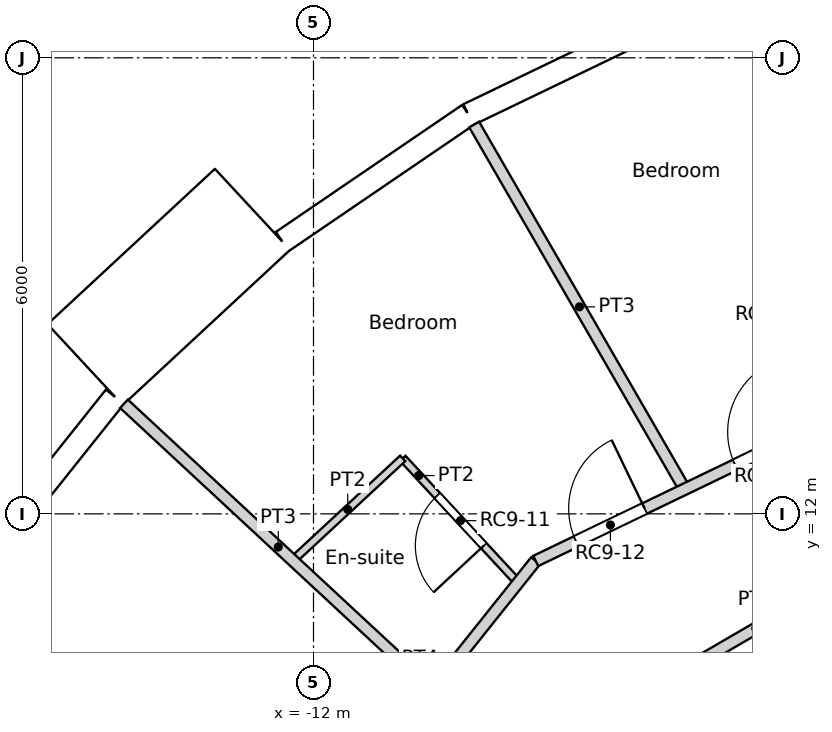
"""IFC4 building model, lengths in metres.
Left out: names, types, materials, properties, quantities, classifications, styles, units other than length and angle.
Written with IfcOpenShell. Run it as: python <this file> out.ifc"""

import sys

from ifc_helpers import new_model, si_unit, direction, frame, frame_2d, origin, origin_2d, place, context, subcontext, project, spatial, rectangle, circle, extrude, element, fill, save


model = new_model("IFC4")
c1 = context("Model", 3, precision=1e-05, world=origin(), true_north=direction((0.0, 1.0)))
c2 = subcontext(c1, "Body", "Model", "MODEL_VIEW")
j1 = project(units=[si_unit("LENGTHUNIT", "METRE"), si_unit("PLANEANGLEUNIT", "RADIAN")], contexts=[c1])
p1 = place(None, origin())
s1 = spatial("IfcSite", under=j1, at=p1, CompositionType="ELEMENT")
p2 = place(p1, origin())
s2 = spatial("IfcBuilding", under=s1, at=p2, CompositionType="ELEMENT")
p3 = place(p2, frame((0.0, 0.0, 316.2)))
s3 = spatial("IfcBuildingStorey", under=s2, at=p3, CompositionType="ELEMENT", Elevation=316.2)
for number, where, z_axis, x_axis in (
    (1, (-9.411, 16.301, 0.0), (0.0, 0.0, 1.0), (1.0, 0.0, 0.0)),
    (2, (-13.798, 12.802, 0.0), (0.0, 0.0, 1.0), (1.0, 0.0, 0.0)),
):
    element("IfcColumn", number, at=place(p3, frame(where, z_axis=z_axis, x_axis=x_axis)), inside=s3, PredefinedType="COLUMN", context=c2, shape_type="SweptSolid", body=[
        extrude(circle(Radius=0.45, at=origin_2d()), origin(), (0.0, 0.0, 1.0), 3.6),
    ])
p4 = place(p3, frame((-7.292, 18.538, 0.0), z_axis=(0.0, 0.0, 1.0), x_axis=(-0.90095513435, -0.433912255978, 0.0)))
e3 = element("IfcWall", 3, at=p4, inside=s3, PredefinedType="SOLIDWALL", context=c2, shape_type="SweptSolid", body=[
    extrude(rectangle(XDim=2.962, YDim=0.3, at=frame_2d((1.481, 0.0))), origin(), (0.0, 0.0, 1.0), 3.25),
])
p5 = place(p4, frame((1.481, 0.0, 1.55)))
e4 = element("IfcOpeningElement", 4, at=p5, cuts=e3, PredefinedType="OPENING", context=c2, shape_type="SweptSolid", body=[
    extrude(circle(Radius=0.9, at=origin_2d()), frame((0.0, 0.16, 0.0), z_axis=(0.0, -1.0, 0.0), x_axis=(1.0, 0.0, 0.0)), (0.0, 0.0, 1.0), 0.32),
])
p6 = place(p3, frame((-9.961, 17.253, 0.0), z_axis=(0.0, 0.0, 1.0), x_axis=(-0.826236061068, -0.563324037646, 0.0)))
e5 = element("IfcWall", 5, at=p6, inside=s3, PredefinedType="SOLIDWALL", context=c2, shape_type="SweptSolid", body=[
    extrude(rectangle(XDim=2.962, YDim=0.3, at=frame_2d((1.481, 0.0))), origin(), (0.0, 0.0, 1.0), 3.25),
])
p7 = place(p6, frame((1.481, 0.0, 1.55)))
e6 = element("IfcOpeningElement", 6, at=p7, cuts=e5, PredefinedType="OPENING", context=c2, shape_type="SweptSolid", body=[
    extrude(circle(Radius=0.9, at=origin_2d()), frame((0.0, 0.16, 0.0), z_axis=(0.0, -1.0, 0.0), x_axis=(1.0, 0.0, 0.0)), (0.0, 0.0, 1.0), 0.32),
])
p8 = place(p3, frame((-12.804, 16.005, -0.35), z_axis=(0.0, 0.0, 1.0), x_axis=(-0.733022439167, -0.680204457261, 0.0)))
e7 = element("IfcWall", 7, at=p8, inside=s3, PredefinedType="ELEMENTEDWALL", context=c2, shape_type="SweptSolid", body=[
    extrude(rectangle(XDim=3.0, YDim=1.45, at=frame_2d((1.5, 0.0))), origin(), (0.0, 0.0, 1.0), 3.6),
])
p9 = place(p8, frame((1.5, 0.0, 1.9)))
e8 = element("IfcOpeningElement", 8, at=p9, cuts=e7, PredefinedType="OPENING", context=c2, shape_type="SweptSolid", body=[
    extrude(circle(Radius=0.9, at=origin_2d()), frame((0.0, 0.735, 0.0), z_axis=(0.0, -1.0, 0.0), x_axis=(1.0, 0.0, 0.0)), (0.0, 0.0, 1.0), 1.47),
])
p10 = place(p3, frame((-14.613, 13.538, 0.0), z_axis=(0.0, 0.0, 1.0), x_axis=(-0.623498236992, -0.781824755599, 0.0)))
e9 = element("IfcWall", 9, at=p10, inside=s3, PredefinedType="SOLIDWALL", context=c2, shape_type="SweptSolid", body=[
    extrude(rectangle(XDim=2.962, YDim=0.3, at=frame_2d((1.481, 0.0))), origin(), (0.0, 0.0, 1.0), 3.25),
])
p11 = place(p10, frame((1.481, 0.0, 1.55)))
e10 = element("IfcOpeningElement", 10, at=p11, cuts=e9, PredefinedType="OPENING", context=c2, shape_type="SweptSolid", body=[
    extrude(circle(Radius=0.9, at=origin_2d()), frame((0.0, 0.16, 0.0), z_axis=(0.0, -1.0, 0.0), x_axis=(1.0, 0.0, 0.0)), (0.0, 0.0, 1.0), 0.32),
])
p12 = place(p3, frame((-9.092, 8.8, 0.0), z_axis=(0.0, 0.0, 1.0), x_axis=(0.864470922103, 0.502682827277, 0.0)))
e11 = element("IfcWall", 11, at=p12, inside=s3, PredefinedType="PARTITIONING", context=c2, shape_type="SweptSolid", body=[
    extrude(rectangle(XDim=6.735, YDim=0.15, at=frame_2d((3.368, 0.0))), origin(), (0.0, 0.0, 1.0), 3.25),
])
p13 = place(p3, frame((-11.137, 8.803, 0.0), z_axis=(0.0, 0.0, 1.0), x_axis=(0.624018330412, 0.781409702595, 0.0)))
e12 = element("IfcWall", 12, at=p13, inside=s3, PredefinedType="PARTITIONING", context=c2, shape_type="SweptSolid", body=[
    extrude(rectangle(XDim=3.301, YDim=0.15, at=frame_2d((1.65, 0.0))), origin(), (0.0, 0.0, 1.0), 3.25),
])
p14 = place(p3, frame((-9.076, 11.381, 0.0), z_axis=(0.0, 0.0, 1.0), x_axis=(0.900939467372, 0.433944784657, 0.0)))
e13 = element("IfcWall", 13, at=p14, inside=s3, PredefinedType="PARTITIONING", context=c2, shape_type="SweptSolid", body=[
    extrude(rectangle(XDim=6.479, YDim=0.15, at=frame_2d((3.239, 0.0))), origin(), (0.0, 0.0, 1.0), 3.25),
])
p15 = place(p14, frame((2.912, 0.0, 0.0)))
e14 = element("IfcOpeningElement", 14, at=p15, cuts=e13, PredefinedType="OPENING", context=c2, shape_type="SweptSolid", body=[
    extrude(rectangle(XDim=1.0, YDim=2.1, at=frame_2d((0.5, 1.05))), frame((0.0, 0.075, 0.0), z_axis=(0.0, -1.0, 0.0), x_axis=(1.0, 0.0, 0.0)), (0.0, 0.0, 1.0), 0.15),
])
p16 = place(p14, frame((0.59, 0.0, 0.0)))
e15 = element("IfcOpeningElement", 15, at=p16, cuts=e13, PredefinedType="OPENING", context=c2, shape_type="SweptSolid", body=[
    extrude(rectangle(XDim=1.0, YDim=2.1, at=frame_2d((0.5, 1.05))), frame((0.0, 0.075, 0.0), z_axis=(0.0, -1.0, 0.0), x_axis=(1.0, 0.0, 0.0)), (0.0, 0.0, 1.0), 0.15),
])
p17 = place(p3, frame((-9.886, 17.122, 0.0), z_axis=(0.0, 0.0, 1.0), x_axis=(0.500054359786, -0.865994016873, 0.0)))
e16 = element("IfcWall", 16, at=p17, inside=s3, PredefinedType="PARTITIONING", context=c2, shape_type="SweptSolid", body=[
    extrude(rectangle(XDim=5.54, YDim=0.15, at=frame_2d((2.77, 0.0))), origin(), (0.0, 0.0, 1.0), 3.25),
])
p18 = place(p3, frame((-10.826, 12.73, 0.0), z_axis=(0.0, 0.0, 1.0), x_axis=(0.680228963773, -0.732999697711, 0.0)))
e17 = element("IfcWall", 17, at=p18, inside=s3, PredefinedType="PARTITIONING", context=c2, shape_type="SweptSolid", body=[
    extrude(rectangle(XDim=2.235, YDim=0.1, at=frame_2d((1.117, 0.0))), origin(), (0.0, 0.0, 1.0), 3.25),
])
p19 = place(p18, frame((0.667, 0.0, 0.0)))
e18 = element("IfcOpeningElement", 18, at=p19, cuts=e17, PredefinedType="OPENING", context=c2, shape_type="SweptSolid", body=[
    extrude(rectangle(XDim=0.9, YDim=2.04, at=frame_2d((0.45, 1.02))), frame((0.0, 0.05, 0.0), z_axis=(0.0, -1.0, 0.0), x_axis=(1.0, 0.0, 0.0)), (0.0, 0.0, 1.0), 0.1),
])
p20 = place(p3, frame((-12.273, 11.387, 0.0), z_axis=(0.0, 0.0, 1.0), x_axis=(0.732956436026, 0.680275578636, 0.0)))
e19 = element("IfcWall", 19, at=p20, inside=s3, PredefinedType="PARTITIONING", context=c2, shape_type="SweptSolid", body=[
    extrude(rectangle(XDim=1.974, YDim=0.1, at=frame_2d((0.987, 0.0))), origin(), (0.0, 0.0, 1.0), 3.25),
])
p21 = place(p3, frame((-14.493, 13.448, 0.0), z_axis=(0.0, 0.0, 1.0), x_axis=(0.732845293448, -0.680395308531, 0.0)))
e20 = element("IfcWall", 20, at=p21, inside=s3, PredefinedType="PARTITIONING", context=c2, shape_type="SweptSolid", body=[
    extrude(rectangle(XDim=5.539, YDim=0.15, at=frame_2d((2.77, 0.0))), origin(), (0.0, 0.0, 1.0), 3.25),
])
p22 = place(p5, origin())
e21 = element("IfcWindow", 21, at=p22, inside=s3, PartitioningType="SINGLE_PANEL", PredefinedType="WINDOW", context=c2, shape_type="SweptSolid", body=[
    extrude(circle(Radius=0.9, at=origin_2d()), frame((0.0, 0.12, 0.0), z_axis=(0.0, -1.0, 0.0), x_axis=(1.0, 0.0, 0.0)), (0.0, 0.0, 1.0), 0.1),
])
fill(e4, e21)
p23 = place(p7, origin())
e22 = element("IfcWindow", 22, at=p23, inside=s3, PartitioningType="SINGLE_PANEL", PredefinedType="WINDOW", context=c2, shape_type="SweptSolid", body=[
    extrude(circle(Radius=0.9, at=origin_2d()), frame((0.0, 0.12, 0.0), z_axis=(0.0, -1.0, 0.0), x_axis=(1.0, 0.0, 0.0)), (0.0, 0.0, 1.0), 0.1),
])
fill(e6, e22)
p24 = place(p9, origin())
e23 = element("IfcWindow", 23, at=p24, inside=s3, PartitioningType="SINGLE_PANEL", PredefinedType="WINDOW", context=c2, shape_type="SweptSolid", body=[
    extrude(circle(Radius=0.9, at=origin_2d()), frame((0.0, 0.695, 0.0), z_axis=(0.0, -1.0, 0.0), x_axis=(1.0, 0.0, 0.0)), (0.0, 0.0, 1.0), 0.1),
])
fill(e8, e23)
p25 = place(p11, origin())
e24 = element("IfcWindow", 24, at=p25, inside=s3, PartitioningType="SINGLE_PANEL", PredefinedType="WINDOW", context=c2, shape_type="SweptSolid", body=[
    extrude(circle(Radius=0.9, at=origin_2d()), frame((0.0, 0.12, 0.0), z_axis=(0.0, -1.0, 0.0), x_axis=(1.0, 0.0, 0.0)), (0.0, 0.0, 1.0), 0.1),
])
fill(e10, e24)
p26 = place(p15, origin())
e25 = element("IfcDoor", 25, at=p26, inside=s3, OperationType="SINGLE_SWING_RIGHT", PredefinedType="DOOR", context=c2, shape_type="SweptSolid", body=[
    extrude(rectangle(XDim=1.0, YDim=2.1, at=frame_2d((0.5, 1.05))), frame((0.0, 0.025, 0.0), z_axis=(0.0, -1.0, 0.0), x_axis=(1.0, 0.0, 0.0)), (0.0, 0.0, 1.0), 0.05),
])
fill(e14, e25)
p27 = place(p19, origin())
e26 = element("IfcDoor", 26, at=p27, inside=s3, OperationType="SINGLE_SWING_LEFT", PredefinedType="DOOR", context=c2, shape_type="SweptSolid", body=[
    extrude(rectangle(XDim=0.9, YDim=2.04, at=frame_2d((0.45, 1.02))), frame((0.0, 0.025, 0.0), z_axis=(0.0, -1.0, 0.0), x_axis=(1.0, 0.0, 0.0)), (0.0, 0.0, 1.0), 0.05),
])
fill(e18, e26)
p28 = place(p16, origin())
e27 = element("IfcDoor", 27, at=p28, inside=s3, OperationType="SINGLE_SWING_RIGHT", PredefinedType="DOOR", context=c2, shape_type="SweptSolid", body=[
    extrude(rectangle(XDim=1.0, YDim=2.1, at=frame_2d((0.5, 1.05))), frame((0.0, 0.025, 0.0), z_axis=(0.0, -1.0, 0.0), x_axis=(1.0, 0.0, 0.0)), (0.0, 0.0, 1.0), 0.05),
])
fill(e15, e27)
save(model, sys.argv[1])
